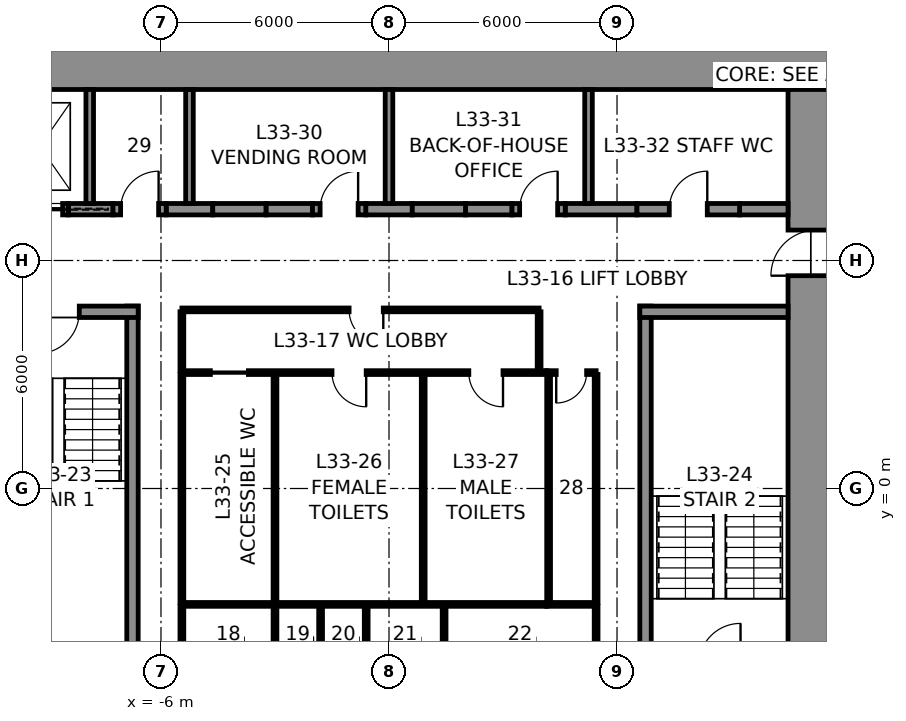
"""IFC4 building model, lengths in metres.
Left out: names, types, materials, properties, quantities, classifications, styles, units other than length and angle.
Written with IfcOpenShell. Run it as: python <this file> out.ifc"""

import sys

from ifc_helpers import new_model, si_unit, direction, frame, frame_2d, origin, place, context, subcontext, project, spatial, rectangle, extrude, element, fill, save


model = new_model("IFC4")
c1 = context("Model", 3, precision=1e-05, world=origin(), true_north=direction((0.0, 1.0)))
c2 = subcontext(c1, "Body", "Model", "MODEL_VIEW")
j1 = project(units=[si_unit("LENGTHUNIT", "METRE"), si_unit("PLANEANGLEUNIT", "RADIAN")], contexts=[c1])
p1 = place(None, origin())
s1 = spatial("IfcSite", under=j1, at=p1, CompositionType="ELEMENT")
p2 = place(p1, origin())
s2 = spatial("IfcBuilding", under=s1, at=p2, CompositionType="ELEMENT")
p3 = place(p2, frame((0.0, 0.0, 159.8)))
s3 = spatial("IfcBuildingStorey", under=s2, at=p3, CompositionType="ELEMENT", Elevation=159.8)
p4 = place(p3, frame((-12.0, 11.25, 0.0), z_axis=(0.0, 0.0, 1.0), x_axis=(1.0, 0.0, 0.0)))
e1 = element("IfcWall", 1, at=p4, inside=s3, PredefinedType="SHEAR", context=c2, shape_type="SweptSolid", body=[
    extrude(rectangle(XDim=24.0, YDim=1.5, at=frame_2d((12.0, 0.0))), origin(), (0.0, 0.0, 1.0), 4.0),
])
p5 = place(p3, frame((11.25, 10.5, 0.0), z_axis=(0.0, 0.0, 1.0), x_axis=(0.0, -1.0, 0.0)))
e2 = element("IfcWall", 2, at=p5, inside=s3, PredefinedType="SHEAR", context=c2, shape_type="SweptSolid", body=[
    extrude(rectangle(XDim=21.0, YDim=1.5, at=frame_2d((10.5, 0.0))), origin(), (0.0, 0.0, 1.0), 4.0),
])
p6 = place(p5, frame((3.7, 0.0, 0.0)))
e3 = element("IfcOpeningElement", 3, at=p6, cuts=e2, PredefinedType="OPENING", context=c2, shape_type="SweptSolid", body=[
    extrude(rectangle(XDim=1.2, YDim=2.3, at=frame_2d((0.6, 1.15))), frame((0.0, 0.76, 0.0), z_axis=(0.0, -1.0, 0.0), x_axis=(1.0, 0.0, 0.0)), (0.0, 0.0, 1.0), 1.52),
])
p7 = place(p5, frame((16.1, 0.0, 0.0)))
e4 = element("IfcOpeningElement", 4, at=p7, cuts=e2, PredefinedType="OPENING", context=c2, shape_type="SweptSolid", body=[
    extrude(rectangle(XDim=1.2, YDim=2.3, at=frame_2d((0.6, 1.15))), frame((0.0, 0.76, 0.0), z_axis=(0.0, -1.0, 0.0), x_axis=(1.0, 0.0, 0.0)), (0.0, 0.0, 1.0), 1.52),
])
p8 = place(p3, frame((-8.438, 7.35, 0.0), z_axis=(0.0, 0.0, 1.0), x_axis=(1.0, 0.0, 0.0)))
e5 = element("IfcWall", 5, at=p8, inside=s3, PredefinedType="SHEAR", context=c2, shape_type="SweptSolid", body=[
    extrude(rectangle(XDim=1.175, YDim=0.3, at=frame_2d((0.587, 0.0))), origin(), (0.0, 0.0, 1.0), 4.0),
])
for number, where, z_axis, x_axis in (
    (6, (-5.863, 7.35, 0.0), (0.0, 0.0, 1.0), (1.0, 0.0, 0.0)),
    (7, (-3.238, 7.35, 0.0), (0.0, 0.0, 1.0), (1.0, 0.0, 0.0)),
    (8, (-0.613, 7.35, 0.0), (0.0, 0.0, 1.0), (1.0, 0.0, 0.0)),
    (9, (2.012, 7.35, 0.0), (0.0, 0.0, 1.0), (1.0, 0.0, 0.0)),
):
    element("IfcWall", number, at=place(p3, frame(where, z_axis=z_axis, x_axis=x_axis)), inside=s3, PredefinedType="SHEAR", context=c2, shape_type="SweptSolid", body=[
        extrude(rectangle(XDim=1.225, YDim=0.3, at=frame_2d((0.613, 0.0))), origin(), (0.0, 0.0, 1.0), 4.0),
    ])
p9 = place(p3, frame((4.637, 7.35, 0.0), z_axis=(0.0, 0.0, 1.0), x_axis=(1.0, 0.0, 0.0)))
e10 = element("IfcWall", 10, at=p9, inside=s3, PredefinedType="SHEAR", context=c2, shape_type="SweptSolid", body=[
    extrude(rectangle(XDim=1.887, YDim=0.3, at=frame_2d((0.944, 0.0))), origin(), (0.0, 0.0, 1.0), 4.0),
])
p10 = place(p3, frame((9.225, 7.35, 0.0), z_axis=(0.0, 0.0, 1.0), x_axis=(1.0, 0.0, 0.0)))
e11 = element("IfcWall", 11, at=p10, inside=s3, PredefinedType="SHEAR", context=c2, shape_type="SweptSolid", body=[
    extrude(rectangle(XDim=1.275, YDim=0.3, at=frame_2d((0.637, 0.0))), origin(), (0.0, 0.0, 1.0), 4.0),
])
p11 = place(p3, frame((-9.938, 7.35, 0.0), z_axis=(0.0, 0.0, 1.0), x_axis=(1.0, 0.0, 0.0)))
e12 = element("IfcWall", 12, at=p11, inside=s3, PredefinedType="PARTITIONING", context=c2, shape_type="SweptSolid", body=[
    extrude(rectangle(XDim=1.5, YDim=0.3, at=frame_2d((0.75, 0.0))), origin(), (0.0, 0.0, 1.0), 4.0),
])
p12 = place(p11, frame((0.15, 0.0, 0.0)))
e13 = element("IfcOpeningElement", 13, at=p12, cuts=e12, PredefinedType="OPENING", context=c2, shape_type="SweptSolid", body=[
    extrude(rectangle(XDim=1.2, YDim=2.3, at=frame_2d((0.6, 1.15))), frame((0.0, 0.16, 0.0), z_axis=(0.0, -1.0, 0.0), x_axis=(1.0, 0.0, 0.0)), (0.0, 0.0, 1.0), 0.32),
])
p13 = place(p3, frame((-7.262, 7.35, 0.0), z_axis=(0.0, 0.0, 1.0), x_axis=(1.0, 0.0, 0.0)))
e14 = element("IfcWall", 14, at=p13, inside=s3, PredefinedType="PARTITIONING", context=c2, shape_type="SweptSolid", body=[
    extrude(rectangle(XDim=1.4, YDim=0.3, at=frame_2d((0.7, 0.0))), origin(), (0.0, 0.0, 1.0), 4.0),
])
p14 = place(p13, frame((0.2, 0.0, 0.0)))
e15 = element("IfcOpeningElement", 15, at=p14, cuts=e14, PredefinedType="OPENING", context=c2, shape_type="SweptSolid", body=[
    extrude(rectangle(XDim=1.0, YDim=2.3, at=frame_2d((0.5, 1.15))), frame((0.0, 0.16, 0.0), z_axis=(0.0, -1.0, 0.0), x_axis=(1.0, 0.0, 0.0)), (0.0, 0.0, 1.0), 0.32),
])
p15 = place(p3, frame((-4.637, 7.35, 0.0), z_axis=(0.0, 0.0, 1.0), x_axis=(1.0, 0.0, 0.0)))
e16 = element("IfcWall", 16, at=p15, inside=s3, PredefinedType="PARTITIONING", context=c2, shape_type="SweptSolid", body=[
    extrude(rectangle(XDim=1.4, YDim=0.3, at=frame_2d((0.7, 0.0))), origin(), (0.0, 0.0, 1.0), 4.0),
])
p16 = place(p3, frame((-2.012, 7.35, 0.0), z_axis=(0.0, 0.0, 1.0), x_axis=(1.0, 0.0, 0.0)))
e17 = element("IfcWall", 17, at=p16, inside=s3, PredefinedType="PARTITIONING", context=c2, shape_type="SweptSolid", body=[
    extrude(rectangle(XDim=1.4, YDim=0.3, at=frame_2d((0.7, 0.0))), origin(), (0.0, 0.0, 1.0), 4.0),
])
p17 = place(p16, frame((0.2, 0.0, 0.0)))
e18 = element("IfcOpeningElement", 18, at=p17, cuts=e17, PredefinedType="OPENING", context=c2, shape_type="SweptSolid", body=[
    extrude(rectangle(XDim=1.0, YDim=2.3, at=frame_2d((0.5, 1.15))), frame((0.0, 0.16, 0.0), z_axis=(0.0, -1.0, 0.0), x_axis=(1.0, 0.0, 0.0)), (0.0, 0.0, 1.0), 0.32),
])
p18 = place(p3, frame((0.613, 7.35, 0.0), z_axis=(0.0, 0.0, 1.0), x_axis=(1.0, 0.0, 0.0)))
e19 = element("IfcWall", 19, at=p18, inside=s3, PredefinedType="PARTITIONING", context=c2, shape_type="SweptSolid", body=[
    extrude(rectangle(XDim=1.4, YDim=0.3, at=frame_2d((0.7, 0.0))), origin(), (0.0, 0.0, 1.0), 4.0),
])
p19 = place(p3, frame((3.238, 7.35, 0.0), z_axis=(0.0, 0.0, 1.0), x_axis=(1.0, 0.0, 0.0)))
e20 = element("IfcWall", 20, at=p19, inside=s3, PredefinedType="PARTITIONING", context=c2, shape_type="SweptSolid", body=[
    extrude(rectangle(XDim=1.4, YDim=0.3, at=frame_2d((0.7, 0.0))), origin(), (0.0, 0.0, 1.0), 4.0),
])
p20 = place(p19, frame((0.2, 0.0, 0.0)))
e21 = element("IfcOpeningElement", 21, at=p20, cuts=e20, PredefinedType="OPENING", context=c2, shape_type="SweptSolid", body=[
    extrude(rectangle(XDim=1.0, YDim=2.3, at=frame_2d((0.5, 1.15))), frame((0.0, 0.16, 0.0), z_axis=(0.0, -1.0, 0.0), x_axis=(1.0, 0.0, 0.0)), (0.0, 0.0, 1.0), 0.32),
])
p21 = place(p3, frame((6.525, 7.35, 0.0), z_axis=(0.0, 0.0, 1.0), x_axis=(1.0, 0.0, 0.0)))
e22 = element("IfcWall", 22, at=p21, inside=s3, PredefinedType="PARTITIONING", context=c2, shape_type="SweptSolid", body=[
    extrude(rectangle(XDim=2.7, YDim=0.3, at=frame_2d((1.35, 0.0))), origin(), (0.0, 0.0, 1.0), 4.0),
])
p22 = place(p21, frame((0.85, 0.0, 0.0)))
e23 = element("IfcOpeningElement", 23, at=p22, cuts=e22, PredefinedType="OPENING", context=c2, shape_type="SweptSolid", body=[
    extrude(rectangle(XDim=1.0, YDim=2.3, at=frame_2d((0.5, 1.15))), frame((0.0, 0.16, 0.0), z_axis=(0.0, -1.0, 0.0), x_axis=(1.0, 0.0, 0.0)), (0.0, 0.0, 1.0), 0.32),
])
for number, where, z_axis, x_axis in (
    (24, (-7.875, 7.5, 0.0), (0.0, 0.0, 1.0), (0.0, 1.0, 0.0)),
    (25, (-5.25, 7.5, 0.0), (0.0, 0.0, 1.0), (0.0, 1.0, 0.0)),
    (26, (0.0, 7.5, 0.0), (0.0, 0.0, 1.0), (0.0, 1.0, 0.0)),
    (27, (5.25, 7.5, 0.0), (0.0, 0.0, 1.0), (0.0, 1.0, 0.0)),
):
    element("IfcWall", number, at=place(p3, frame(where, z_axis=z_axis, x_axis=x_axis)), inside=s3, PredefinedType="PARTITIONING", context=c2, shape_type="SweptSolid", body=[
        extrude(rectangle(XDim=3.0, YDim=0.2, at=frame_2d((1.5, 0.0))), origin(), (0.0, 0.0, 1.0), 4.0),
    ])
p23 = place(p3, frame((-6.75, -4.8, 0.0), z_axis=(0.0, 0.0, 1.0), x_axis=(0.0, 1.0, 0.0)))
e28 = element("IfcWall", 28, at=p23, inside=s3, PredefinedType="SOLIDWALL", context=c2, shape_type="SweptSolid", body=[
    extrude(rectangle(XDim=9.6, YDim=0.3, at=frame_2d((4.8, 0.0))), origin(), (0.0, 0.0, 1.0), 3.75),
])
p24 = place(p3, frame((-10.5, 4.65, 0.0), z_axis=(0.0, 0.0, 1.0), x_axis=(1.0, 0.0, 0.0)))
e29 = element("IfcWall", 29, at=p24, inside=s3, PredefinedType="SOLIDWALL", context=c2, shape_type="SweptSolid", body=[
    extrude(rectangle(XDim=3.9, YDim=0.3, at=frame_2d((1.95, 0.0))), origin(), (0.0, 0.0, 1.0), 3.75),
])
p25 = place(p24, frame((1.25, 0.0, 0.0)))
e30 = element("IfcOpeningElement", 30, at=p25, cuts=e29, PredefinedType="OPENING", context=c2, shape_type="SweptSolid", body=[
    extrude(rectangle(XDim=1.1, YDim=2.3, at=frame_2d((0.55, 1.15))), frame((0.0, 0.16, 0.0), z_axis=(0.0, -1.0, 0.0), x_axis=(1.0, 0.0, 0.0)), (0.0, 0.0, 1.0), 0.32),
])
p26 = place(p3, frame((6.75, -4.8, 0.0), z_axis=(0.0, 0.0, 1.0), x_axis=(0.0, 1.0, 0.0)))
e31 = element("IfcWall", 31, at=p26, inside=s3, PredefinedType="SOLIDWALL", context=c2, shape_type="SweptSolid", body=[
    extrude(rectangle(XDim=9.6, YDim=0.3, at=frame_2d((4.8, 0.0))), origin(), (0.0, 0.0, 1.0), 3.75),
])
p27 = place(p3, frame((6.6, 4.65, 0.0), z_axis=(0.0, 0.0, 1.0), x_axis=(1.0, 0.0, 0.0)))
e32 = element("IfcWall", 32, at=p27, inside=s3, PredefinedType="SOLIDWALL", context=c2, shape_type="SweptSolid", body=[
    extrude(rectangle(XDim=3.9, YDim=0.3, at=frame_2d((1.95, 0.0))), origin(), (0.0, 0.0, 1.0), 3.75),
])
p28 = place(p3, frame((-5.45, 3.05, 0.0), z_axis=(0.0, 0.0, 1.0), x_axis=(1.0, 0.0, 0.0)))
e33 = element("IfcWall", 33, at=p28, inside=s3, PredefinedType="PARTITIONING", context=c2, shape_type="SweptSolid", body=[
    extrude(rectangle(XDim=9.6, YDim=0.1, at=frame_2d((4.8, 0.0))), origin(), (0.0, 0.0, 1.0), 3.75),
])
p29 = place(p28, frame((0.75, 0.0, 0.0)))
e34 = element("IfcOpeningElement", 34, at=p29, cuts=e33, PredefinedType="OPENING", context=c2, shape_type="SweptSolid", body=[
    extrude(rectangle(XDim=1.0, YDim=2.3, at=frame_2d((0.5, 1.15))), frame((0.0, 0.06, 0.0), z_axis=(0.0, -1.0, 0.0), x_axis=(1.0, 0.0, 0.0)), (0.0, 0.0, 1.0), 0.12),
])
p30 = place(p28, frame((3.95, 0.0, 0.0)))
e35 = element("IfcOpeningElement", 35, at=p30, cuts=e33, PredefinedType="OPENING", context=c2, shape_type="SweptSolid", body=[
    extrude(rectangle(XDim=0.9, YDim=2.3, at=frame_2d((0.45, 1.15))), frame((0.0, 0.06, 0.0), z_axis=(0.0, -1.0, 0.0), x_axis=(1.0, 0.0, 0.0)), (0.0, 0.0, 1.0), 0.12),
])
p31 = place(p28, frame((7.55, 0.0, 0.0)))
e36 = element("IfcOpeningElement", 36, at=p31, cuts=e33, PredefinedType="OPENING", context=c2, shape_type="SweptSolid", body=[
    extrude(rectangle(XDim=0.9, YDim=2.3, at=frame_2d((0.45, 1.15))), frame((0.0, 0.06, 0.0), z_axis=(0.0, -1.0, 0.0), x_axis=(1.0, 0.0, 0.0)), (0.0, 0.0, 1.0), 0.12),
])
p32 = place(p3, frame((4.15, 3.05, 0.0), z_axis=(0.0, 0.0, 1.0), x_axis=(1.0, 0.0, 0.0)))
e37 = element("IfcWall", 37, at=p32, inside=s3, PredefinedType="PARTITIONING", context=c2, shape_type="SweptSolid", body=[
    extrude(rectangle(XDim=1.3, YDim=0.1, at=frame_2d((0.65, 0.0))), origin(), (0.0, 0.0, 1.0), 3.75),
])
p33 = place(p32, frame((0.25, 0.0, 0.0)))
e38 = element("IfcOpeningElement", 38, at=p33, cuts=e37, PredefinedType="OPENING", context=c2, shape_type="SweptSolid", body=[
    extrude(rectangle(XDim=0.8, YDim=2.3, at=frame_2d((0.4, 1.15))), frame((0.0, 0.06, 0.0), z_axis=(0.0, -1.0, 0.0), x_axis=(1.0, 0.0, 0.0)), (0.0, 0.0, 1.0), 0.12),
])
p34 = place(p3, frame((4.15, -3.05, 0.0), z_axis=(0.0, 0.0, 1.0), x_axis=(-1.0, 0.0, 0.0)))
e39 = element("IfcWall", 39, at=p34, inside=s3, PredefinedType="PARTITIONING", context=c2, shape_type="SweptSolid", body=[
    extrude(rectangle(XDim=9.6, YDim=0.1, at=frame_2d((4.8, 0.0))), origin(), (0.0, 0.0, 1.0), 3.75),
])
p35 = place(p3, frame((5.45, -3.05, 0.0), z_axis=(0.0, 0.0, 1.0), x_axis=(-1.0, 0.0, 0.0)))
e40 = element("IfcWall", 40, at=p35, inside=s3, PredefinedType="PARTITIONING", context=c2, shape_type="SweptSolid", body=[
    extrude(rectangle(XDim=1.3, YDim=0.1, at=frame_2d((0.65, 0.0))), origin(), (0.0, 0.0, 1.0), 3.75),
])
for number, where, z_axis, x_axis in (
    (41, (5.45, 3.0, 0.0), (0.0, 0.0, 1.0), (0.0, -1.0, 0.0)),
    (42, (-5.45, -3.0, 0.0), (0.0, 0.0, 1.0), (0.0, 1.0, 0.0)),
    (43, (-3.0, -3.0, 0.0), (0.0, 0.0, 1.0), (0.0, 1.0, 0.0)),
    (44, (0.9, -3.0, 0.0), (0.0, 0.0, 1.0), (0.0, 1.0, 0.0)),
    (45, (4.2, -3.0, 0.0), (0.0, 0.0, 1.0), (0.0, 1.0, 0.0)),
):
    element("IfcWall", number, at=place(p3, frame(where, z_axis=z_axis, x_axis=x_axis)), inside=s3, PredefinedType="PARTITIONING", context=c2, shape_type="SweptSolid", body=[
        extrude(rectangle(XDim=6.0, YDim=0.1, at=frame_2d((3.0, 0.0))), origin(), (0.0, 0.0, 1.0), 3.75),
    ])
p36 = place(p3, frame((-5.45, 4.7, 0.0), z_axis=(0.0, 0.0, 1.0), x_axis=(1.0, 0.0, 0.0)))
e46 = element("IfcWall", 46, at=p36, inside=s3, PredefinedType="PARTITIONING", context=c2, shape_type="SweptSolid", body=[
    extrude(rectangle(XDim=9.4, YDim=0.1, at=frame_2d((4.7, 0.0))), origin(), (0.0, 0.0, 1.0), 3.75),
])
p37 = place(p36, frame((4.4, 0.0, 0.0)))
e47 = element("IfcOpeningElement", 47, at=p37, cuts=e46, PredefinedType="OPENING", context=c2, shape_type="SweptSolid", body=[
    extrude(rectangle(XDim=0.9, YDim=2.3, at=frame_2d((0.45, 1.15))), frame((0.0, 0.06, 0.0), z_axis=(0.0, -1.0, 0.0), x_axis=(1.0, 0.0, 0.0)), (0.0, 0.0, 1.0), 0.12),
])
for number, where, z_axis, x_axis in (
    (48, (-5.45, 3.1, 0.0), (0.0, 0.0, 1.0), (0.0, 1.0, 0.0)),
    (49, (3.95, 3.1, 0.0), (0.0, 0.0, 1.0), (0.0, 1.0, 0.0)),
    (50, (-5.45, -3.1, 0.0), (0.0, 0.0, 1.0), (0.0, -1.0, 0.0)),
    (51, (5.45, -3.1, 0.0), (0.0, 0.0, 1.0), (0.0, -1.0, 0.0)),
    (52, (-3.0, -3.1, 0.0), (0.0, 0.0, 1.0), (0.0, -1.0, 0.0)),
    (53, (-1.8, -3.1, 0.0), (0.0, 0.0, 1.0), (0.0, -1.0, 0.0)),
    (54, (-0.6, -3.1, 0.0), (0.0, 0.0, 1.0), (0.0, -1.0, 0.0)),
    (55, (1.45, -3.1, 0.0), (0.0, 0.0, 1.0), (0.0, -1.0, 0.0)),
):
    element("IfcWall", number, at=place(p3, frame(where, z_axis=z_axis, x_axis=x_axis)), inside=s3, PredefinedType="PARTITIONING", context=c2, shape_type="SweptSolid", body=[
        extrude(rectangle(XDim=1.55, YDim=0.1, at=frame_2d((0.775, 0.0))), origin(), (0.0, 0.0, 1.0), 3.75),
    ])
p38 = place(p25, frame((1.1, 0.0, 0.0), z_axis=(0.0, 0.0, 1.0), x_axis=(-1.0, 0.0, 0.0)))
e56 = element("IfcDoor", 56, at=p38, inside=s3, OperationType="SINGLE_SWING_RIGHT", PredefinedType="DOOR", context=c2, shape_type="SweptSolid", body=[
    extrude(rectangle(XDim=1.1, YDim=2.3, at=frame_2d((0.55, 1.15))), frame((0.0, 0.025, 0.0), z_axis=(0.0, -1.0, 0.0), x_axis=(1.0, 0.0, 0.0)), (0.0, 0.0, 1.0), 0.05),
])
fill(e30, e56)
p39 = place(p29, frame((1.0, 0.0, 0.0), z_axis=(0.0, 0.0, 1.0), x_axis=(-1.0, 0.0, 0.0)))
e57 = element("IfcDoor", 57, at=p39, inside=s3, OperationType="SLIDING_TO_LEFT", PredefinedType="DOOR", context=c2, shape_type="SweptSolid", body=[
    extrude(rectangle(XDim=1.0, YDim=2.3, at=frame_2d((0.5, 1.15))), frame((0.0, 0.025, 0.0), z_axis=(0.0, -1.0, 0.0), x_axis=(1.0, 0.0, 0.0)), (0.0, 0.0, 1.0), 0.05),
])
fill(e34, e57)
p40 = place(p30, frame((0.9, 0.0, 0.0), z_axis=(0.0, 0.0, 1.0), x_axis=(-1.0, 0.0, 0.0)))
e58 = element("IfcDoor", 58, at=p40, inside=s3, OperationType="SINGLE_SWING_LEFT", PredefinedType="DOOR", context=c2, shape_type="SweptSolid", body=[
    extrude(rectangle(XDim=0.9, YDim=2.3, at=frame_2d((0.45, 1.15))), frame((0.0, 0.025, 0.0), z_axis=(0.0, -1.0, 0.0), x_axis=(1.0, 0.0, 0.0)), (0.0, 0.0, 1.0), 0.05),
])
fill(e35, e58)
p41 = place(p31, frame((0.9, 0.0, 0.0), z_axis=(0.0, 0.0, 1.0), x_axis=(-1.0, 0.0, 0.0)))
e59 = element("IfcDoor", 59, at=p41, inside=s3, OperationType="SINGLE_SWING_LEFT", PredefinedType="DOOR", context=c2, shape_type="SweptSolid", body=[
    extrude(rectangle(XDim=0.9, YDim=2.3, at=frame_2d((0.45, 1.15))), frame((0.0, 0.025, 0.0), z_axis=(0.0, -1.0, 0.0), x_axis=(1.0, 0.0, 0.0)), (0.0, 0.0, 1.0), 0.05),
])
fill(e36, e59)
p42 = place(p33, frame((0.8, 0.0, 0.0), z_axis=(0.0, 0.0, 1.0), x_axis=(-1.0, 0.0, 0.0)))
e60 = element("IfcDoor", 60, at=p42, inside=s3, OperationType="SINGLE_SWING_RIGHT", PredefinedType="DOOR", context=c2, shape_type="SweptSolid", body=[
    extrude(rectangle(XDim=0.8, YDim=2.3, at=frame_2d((0.4, 1.15))), frame((0.0, 0.025, 0.0), z_axis=(0.0, -1.0, 0.0), x_axis=(1.0, 0.0, 0.0)), (0.0, 0.0, 1.0), 0.05),
])
fill(e38, e60)
p43 = place(p37, frame((0.9, 0.0, 0.0), z_axis=(0.0, 0.0, 1.0), x_axis=(-1.0, 0.0, 0.0)))
e61 = element("IfcDoor", 61, at=p43, inside=s3, OperationType="SINGLE_SWING_LEFT", PredefinedType="DOOR", context=c2, shape_type="SweptSolid", body=[
    extrude(rectangle(XDim=0.9, YDim=2.3, at=frame_2d((0.45, 1.15))), frame((0.0, 0.025, 0.0), z_axis=(0.0, -1.0, 0.0), x_axis=(1.0, 0.0, 0.0)), (0.0, 0.0, 1.0), 0.05),
])
fill(e47, e61)
p44 = place(p14, origin())
e62 = element("IfcDoor", 62, at=p44, inside=s3, OperationType="SINGLE_SWING_RIGHT", PredefinedType="DOOR", context=c2, shape_type="SweptSolid", body=[
    extrude(rectangle(XDim=1.0, YDim=2.3, at=frame_2d((0.5, 1.15))), frame((0.0, 0.025, 0.0), z_axis=(0.0, -1.0, 0.0), x_axis=(1.0, 0.0, 0.0)), (0.0, 0.0, 1.0), 0.05),
])
fill(e15, e62)
p45 = place(p17, origin())
e63 = element("IfcDoor", 63, at=p45, inside=s3, OperationType="SINGLE_SWING_RIGHT", PredefinedType="DOOR", context=c2, shape_type="SweptSolid", body=[
    extrude(rectangle(XDim=1.0, YDim=2.3, at=frame_2d((0.5, 1.15))), frame((0.0, 0.025, 0.0), z_axis=(0.0, -1.0, 0.0), x_axis=(1.0, 0.0, 0.0)), (0.0, 0.0, 1.0), 0.05),
])
fill(e18, e63)
p46 = place(p20, origin())
e64 = element("IfcDoor", 64, at=p46, inside=s3, OperationType="SINGLE_SWING_RIGHT", PredefinedType="DOOR", context=c2, shape_type="SweptSolid", body=[
    extrude(rectangle(XDim=1.0, YDim=2.3, at=frame_2d((0.5, 1.15))), frame((0.0, 0.025, 0.0), z_axis=(0.0, -1.0, 0.0), x_axis=(1.0, 0.0, 0.0)), (0.0, 0.0, 1.0), 0.05),
])
fill(e21, e64)
p47 = place(p22, origin())
e65 = element("IfcDoor", 65, at=p47, inside=s3, OperationType="SINGLE_SWING_RIGHT", PredefinedType="DOOR", context=c2, shape_type="SweptSolid", body=[
    extrude(rectangle(XDim=1.0, YDim=2.3, at=frame_2d((0.5, 1.15))), frame((0.0, 0.025, 0.0), z_axis=(0.0, -1.0, 0.0), x_axis=(1.0, 0.0, 0.0)), (0.0, 0.0, 1.0), 0.05),
])
fill(e23, e65)
p48 = place(p6, frame((1.2, 0.0, 0.0), z_axis=(0.0, 0.0, 1.0), x_axis=(-1.0, 0.0, 0.0)))
e66 = element("IfcDoor", 66, at=p48, inside=s3, OperationType="SINGLE_SWING_LEFT", PredefinedType="DOOR", context=c2, shape_type="SweptSolid", body=[
    extrude(rectangle(XDim=1.2, YDim=2.3, at=frame_2d((0.6, 1.15))), frame((0.0, 0.025, 0.0), z_axis=(0.0, -1.0, 0.0), x_axis=(1.0, 0.0, 0.0)), (0.0, 0.0, 1.0), 0.05),
])
fill(e3, e66)
p49 = place(p12, frame((1.2, 0.0, 0.0), z_axis=(0.0, 0.0, 1.0), x_axis=(-1.0, 0.0, 0.0)))
e67 = element("IfcDoor", 67, at=p49, inside=s3, OperationType="SLIDING_TO_LEFT", PredefinedType="DOOR", context=c2, shape_type="SweptSolid", body=[
    extrude(rectangle(XDim=1.2, YDim=2.3, at=frame_2d((0.6, 1.15))), frame((0.0, 0.025, 0.0), z_axis=(0.0, -1.0, 0.0), x_axis=(1.0, 0.0, 0.0)), (0.0, 0.0, 1.0), 0.05),
])
fill(e13, e67)
save(model, sys.argv[1])
